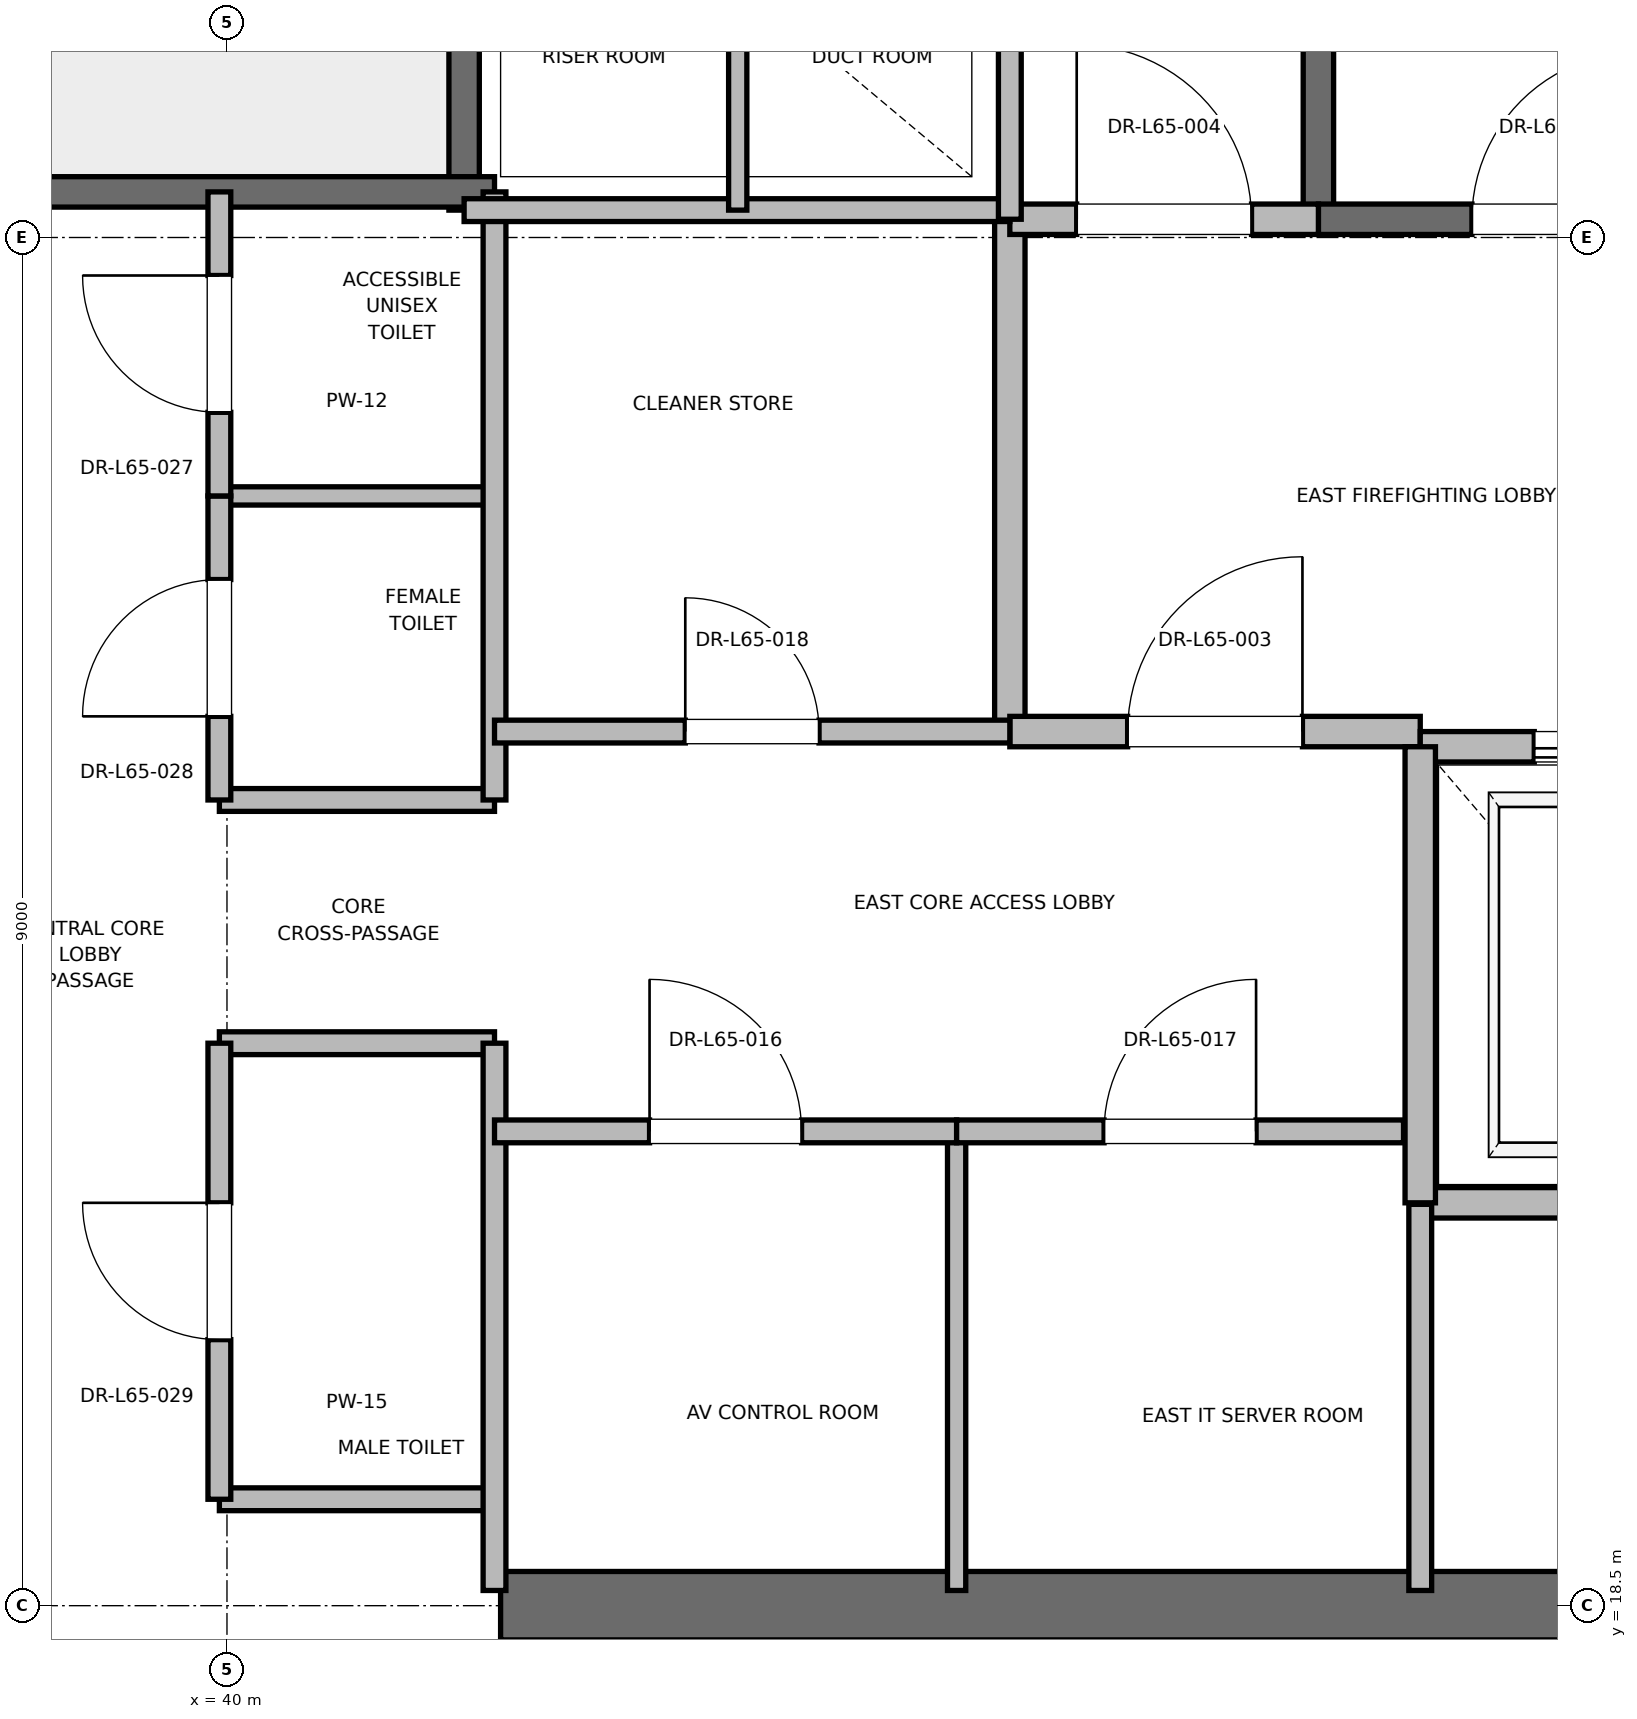
"""IFC4 building model, lengths in metres.
Left out: names, types, materials, properties, quantities, classifications, styles, units other than length and angle.
Written with IfcOpenShell. Run it as: python <this file> out.ifc"""

import sys

from ifc_helpers import new_model, si_unit, direction, frame, frame_2d, origin, place, context, subcontext, project, spatial, rectangle, extrude, element, fill, save


model = new_model("IFC4")
c1 = context("Model", 3, precision=1e-05, world=origin(), true_north=direction((0.0, 1.0)))
c2 = subcontext(c1, "Body", "Model", "MODEL_VIEW")
j1 = project(units=[si_unit("LENGTHUNIT", "METRE"), si_unit("PLANEANGLEUNIT", "RADIAN")], contexts=[c1])
p1 = place(None, origin())
s1 = spatial("IfcSite", under=j1, at=p1, CompositionType="ELEMENT")
p2 = place(p1, origin())
s2 = spatial("IfcBuilding", under=s1, at=p2, CompositionType="ELEMENT")
p3 = place(p2, frame((0.0, 0.0, 279.2)))
s3 = spatial("IfcBuildingStorey", under=s2, at=p3, CompositionType="ELEMENT", Elevation=279.2)
p4 = place(p3, frame((41.8, 18.5, 0.0), z_axis=(0.0, 0.0, 1.0), x_axis=(1.0, 0.0, 0.0)))
e1 = element("IfcWall", 1, at=p4, inside=s3, PredefinedType="SHEAR", context=c2, shape_type="SweptSolid", body=[
    extrude(rectangle(XDim=9.2, YDim=0.45, at=frame_2d((4.6, 0.0))), origin(), (0.0, 0.0, 1.0), 3.785),
])
p5 = place(p3, frame((47.18, 27.62, 0.0), z_axis=(0.0, 0.0, 1.0), x_axis=(0.0, 1.0, 0.0)))
e2 = element("IfcWall", 2, at=p5, inside=s3, PredefinedType="SOLIDWALL", context=c2, shape_type="SweptSolid", body=[
    extrude(rectangle(XDim=8.18, YDim=0.2, at=frame_2d((4.09, 0.0))), origin(), (0.0, 0.0, 1.0), 3.785),
])
p6 = place(p3, frame((47.18, 27.62, 0.0), z_axis=(0.0, 0.0, 1.0), x_axis=(1.0, 0.0, 0.0)))
e3 = element("IfcWall", 3, at=p6, inside=s3, PredefinedType="SOLIDWALL", context=c2, shape_type="SweptSolid", body=[
    extrude(rectangle(XDim=3.12, YDim=0.2, at=frame_2d((1.56, 0.0))), origin(), (0.0, 0.0, 1.0), 3.785),
])
p7 = place(p6, frame((1.01, 0.0, 0.0)))
e4 = element("IfcOpeningElement", 4, at=p7, cuts=e3, PredefinedType="OPENING", context=c2, shape_type="SweptSolid", body=[
    extrude(rectangle(XDim=1.1, YDim=2.15, at=frame_2d((0.55, 1.075))), frame((0.0, 0.1, 0.0), z_axis=(0.0, -1.0, 0.0), x_axis=(1.0, 0.0, 0.0)), (0.0, 0.0, 1.0), 0.2),
])
p8 = place(p3, frame((41.56, 27.68, 0.0), z_axis=(0.0, 0.0, 1.0), x_axis=(0.0, 1.0, 0.0)))
e5 = element("IfcWall", 5, at=p8, inside=s3, PredefinedType="SOLIDWALL", context=c2, shape_type="SweptSolid", body=[
    extrude(rectangle(XDim=8.57, YDim=0.2, at=frame_2d((4.285, 0.0))), origin(), (0.0, 0.0, 1.0), 3.785),
])
p9 = place(p3, frame((38.44, 27.8, 0.0), z_axis=(0.0, 0.0, 1.0), x_axis=(1.0, 0.0, 0.0)))
e6 = element("IfcWall", 6, at=p9, inside=s3, PredefinedType="SOLIDWALL", context=c2, shape_type="SweptSolid", body=[
    extrude(rectangle(XDim=3.32, YDim=0.2, at=frame_2d((1.66, 0.0))), origin(), (0.0, 0.0, 1.0), 3.785),
])
p10 = place(p3, frame((45.15, 24.25, 0.0), z_axis=(0.0, 0.0, 1.0), x_axis=(0.0, 1.0, 0.0)))
e7 = element("IfcWall", 7, at=p10, inside=s3, PredefinedType="PARTITIONING", context=c2, shape_type="SweptSolid", body=[
    extrude(rectangle(XDim=3.37, YDim=0.2, at=frame_2d((1.685, 0.0))), origin(), (0.0, 0.0, 1.0), 3.785),
])
p11 = place(p3, frame((45.15, 24.25, 0.0), z_axis=(0.0, 0.0, 1.0), x_axis=(1.0, 0.0, 0.0)))
e8 = element("IfcWall", 8, at=p11, inside=s3, PredefinedType="PARTITIONING", context=c2, shape_type="SweptSolid", body=[
    extrude(rectangle(XDim=2.7, YDim=0.2, at=frame_2d((1.35, 0.0))), origin(), (0.0, 0.0, 1.0), 3.785),
])
p12 = place(p11, frame((0.775, 0.0, 0.0)))
e9 = element("IfcOpeningElement", 9, at=p12, cuts=e8, PredefinedType="OPENING", context=c2, shape_type="SweptSolid", body=[
    extrude(rectangle(XDim=1.15, YDim=2.2, at=frame_2d((0.575, 1.1))), frame((0.0, 0.1, 0.0), z_axis=(0.0, -1.0, 0.0), x_axis=(1.0, 0.0, 0.0)), (0.0, 0.0, 1.0), 0.2),
])
p13 = place(p3, frame((45.15, 27.62, 0.0), z_axis=(0.0, 0.0, 1.0), x_axis=(1.0, 0.0, 0.0)))
e10 = element("IfcWall", 10, at=p13, inside=s3, PredefinedType="PARTITIONING", context=c2, shape_type="SweptSolid", body=[
    extrude(rectangle(XDim=2.03, YDim=0.2, at=frame_2d((1.015, 0.0))), origin(), (0.0, 0.0, 1.0), 3.785),
])
p14 = place(p13, frame((0.44, 0.0, 0.0)))
e11 = element("IfcOpeningElement", 11, at=p14, cuts=e10, PredefinedType="OPENING", context=c2, shape_type="SweptSolid", body=[
    extrude(rectangle(XDim=1.15, YDim=2.2, at=frame_2d((0.575, 1.1))), frame((0.0, 0.1, 0.0), z_axis=(0.0, -1.0, 0.0), x_axis=(1.0, 0.0, 0.0)), (0.0, 0.0, 1.0), 0.2),
])
p15 = place(p3, frame((47.85, 21.15, 0.0), z_axis=(0.0, 0.0, 1.0), x_axis=(1.0, 0.0, 0.0)))
e12 = element("IfcWall", 12, at=p15, inside=s3, PredefinedType="SOLIDWALL", context=c2, shape_type="SweptSolid", body=[
    extrude(rectangle(XDim=2.6, YDim=0.2, at=frame_2d((1.3, 0.0))), origin(), (0.0, 0.0, 1.0), 3.785),
])
p16 = place(p3, frame((50.45, 24.15, 0.0), z_axis=(0.0, 0.0, 1.0), x_axis=(-1.0, 0.0, 0.0)))
e13 = element("IfcWall", 13, at=p16, inside=s3, PredefinedType="SOLIDWALL", context=c2, shape_type="SweptSolid", body=[
    extrude(rectangle(XDim=2.6, YDim=0.2, at=frame_2d((1.3, 0.0))), origin(), (0.0, 0.0, 1.0), 2.865),
])
p17 = place(p16, frame((0.75, 0.0, 0.0)))
e14 = element("IfcOpeningElement", 14, at=p17, cuts=e13, PredefinedType="OPENING", context=c2, shape_type="SweptSolid", body=[
    extrude(rectangle(XDim=1.1, YDim=2.2, at=frame_2d((0.55, 1.1))), frame((0.0, 0.1, 0.0), z_axis=(0.0, -1.0, 0.0), x_axis=(1.0, 0.0, 0.0)), (0.0, 0.0, 1.0), 0.2),
])
p18 = place(p3, frame((47.85, 24.15, 0.0), z_axis=(0.0, 0.0, 1.0), x_axis=(0.0, -1.0, 0.0)))
e15 = element("IfcWall", 15, at=p18, inside=s3, PredefinedType="SOLIDWALL", context=c2, shape_type="SweptSolid", body=[
    extrude(rectangle(XDim=3.0, YDim=0.2, at=frame_2d((1.5, 0.0))), origin(), (0.0, 0.0, 1.0), 3.785),
])
for number, where, z_axis, x_axis in (
    (16, (39.95, 19.2, 0.0), (0.0, 0.0, 1.0), (1.0, 0.0, 0.0)),
    (17, (39.95, 22.2, 0.0), (0.0, 0.0, 1.0), (1.0, 0.0, 0.0)),
    (18, (39.95, 23.8, 0.0), (0.0, 0.0, 1.0), (1.0, 0.0, 0.0)),
):
    element("IfcWall", number, at=place(p3, frame(where, z_axis=z_axis, x_axis=x_axis)), inside=s3, PredefinedType="PARTITIONING", context=c2, shape_type="SweptSolid", body=[
        extrude(rectangle(XDim=1.81, YDim=0.15, at=frame_2d((0.905, 0.0))), origin(), (0.0, 0.0, 1.0), 2.85),
    ])
p19 = place(p3, frame((39.95, 25.8, 0.0), z_axis=(0.0, 0.0, 1.0), x_axis=(1.0, 0.0, 0.0)))
e19 = element("IfcWall", 19, at=p19, inside=s3, PredefinedType="PARTITIONING", context=c2, shape_type="SweptSolid", body=[
    extrude(rectangle(XDim=1.81, YDim=0.12, at=frame_2d((0.905, 0.0))), origin(), (0.0, 0.0, 1.0), 2.85),
])
p20 = place(p3, frame((41.76, 18.6, 0.0), z_axis=(0.0, 0.0, 1.0), x_axis=(0.0, 1.0, 0.0)))
e20 = element("IfcWall", 20, at=p20, inside=s3, PredefinedType="PARTITIONING", context=c2, shape_type="SweptSolid", body=[
    extrude(rectangle(XDim=3.6, YDim=0.15, at=frame_2d((1.8, 0.0))), origin(), (0.0, 0.0, 1.0), 2.85),
])
p21 = place(p3, frame((41.76, 23.8, 0.0), z_axis=(0.0, 0.0, 1.0), x_axis=(0.0, 1.0, 0.0)))
e21 = element("IfcWall", 21, at=p21, inside=s3, PredefinedType="PARTITIONING", context=c2, shape_type="SweptSolid", body=[
    extrude(rectangle(XDim=4.0, YDim=0.15, at=frame_2d((2.0, 0.0))), origin(), (0.0, 0.0, 1.0), 2.85),
])
p22 = place(p3, frame((39.95, 19.2, 0.0), z_axis=(0.0, 0.0, 1.0), x_axis=(0.0, 1.0, 0.0)))
e22 = element("IfcWall", 22, at=p22, inside=s3, PredefinedType="PARTITIONING", context=c2, shape_type="SweptSolid", body=[
    extrude(rectangle(XDim=3.0, YDim=0.15, at=frame_2d((1.5, 0.0))), origin(), (0.0, 0.0, 1.0), 2.85),
])
p23 = place(p22, frame((1.05, 0.0, 0.0)))
e23 = element("IfcOpeningElement", 23, at=p23, cuts=e22, PredefinedType="OPENING", context=c2, shape_type="SweptSolid", body=[
    extrude(rectangle(XDim=0.9, YDim=2.1, at=frame_2d((0.45, 1.05))), frame((0.0, 0.075, 0.0), z_axis=(0.0, -1.0, 0.0), x_axis=(1.0, 0.0, 0.0)), (0.0, 0.0, 1.0), 0.15),
])
p24 = place(p3, frame((39.95, 23.8, 0.0), z_axis=(0.0, 0.0, 1.0), x_axis=(0.0, 1.0, 0.0)))
e24 = element("IfcWall", 24, at=p24, inside=s3, PredefinedType="PARTITIONING", context=c2, shape_type="SweptSolid", body=[
    extrude(rectangle(XDim=2.0, YDim=0.15, at=frame_2d((1.0, 0.0))), origin(), (0.0, 0.0, 1.0), 2.85),
])
p25 = place(p24, frame((0.55, 0.0, 0.0)))
e25 = element("IfcOpeningElement", 25, at=p25, cuts=e24, PredefinedType="OPENING", context=c2, shape_type="SweptSolid", body=[
    extrude(rectangle(XDim=0.9, YDim=2.1, at=frame_2d((0.45, 1.05))), frame((0.0, 0.075, 0.0), z_axis=(0.0, -1.0, 0.0), x_axis=(1.0, 0.0, 0.0)), (0.0, 0.0, 1.0), 0.15),
])
p26 = place(p3, frame((39.95, 25.8, 0.0), z_axis=(0.0, 0.0, 1.0), x_axis=(0.0, 1.0, 0.0)))
e26 = element("IfcWall", 26, at=p26, inside=s3, PredefinedType="PARTITIONING", context=c2, shape_type="SweptSolid", body=[
    extrude(rectangle(XDim=2.0, YDim=0.15, at=frame_2d((1.0, 0.0))), origin(), (0.0, 0.0, 1.0), 2.85),
])
p27 = place(p26, frame((0.55, 0.0, 0.0)))
e27 = element("IfcOpeningElement", 27, at=p27, cuts=e26, PredefinedType="OPENING", context=c2, shape_type="SweptSolid", body=[
    extrude(rectangle(XDim=0.9, YDim=2.1, at=frame_2d((0.45, 1.05))), frame((0.0, 0.075, 0.0), z_axis=(0.0, -1.0, 0.0), x_axis=(1.0, 0.0, 0.0)), (0.0, 0.0, 1.0), 0.15),
])
p28 = place(p3, frame((41.56, 27.68, 0.0), z_axis=(0.0, 0.0, 1.0), x_axis=(1.0, 0.0, 0.0)))
e28 = element("IfcWall", 28, at=p28, inside=s3, PredefinedType="PARTITIONING", context=c2, shape_type="SweptSolid", body=[
    extrude(rectangle(XDim=3.59, YDim=0.15, at=frame_2d((1.795, 0.0))), origin(), (0.0, 0.0, 1.0), 2.85),
])
p29 = place(p3, frame((47.85, 18.6, 0.0), z_axis=(0.0, 0.0, 1.0), x_axis=(0.0, 1.0, 0.0)))
e29 = element("IfcWall", 29, at=p29, inside=s3, PredefinedType="PARTITIONING", context=c2, shape_type="SweptSolid", body=[
    extrude(rectangle(XDim=2.54, YDim=0.15, at=frame_2d((1.27, 0.0))), origin(), (0.0, 0.0, 1.0), 2.85),
])
p30 = place(p3, frame((44.8, 18.6, 0.0), z_axis=(0.0, 0.0, 1.0), x_axis=(0.0, 1.0, 0.0)))
e30 = element("IfcWall", 30, at=p30, inside=s3, PredefinedType="PARTITIONING", context=c2, shape_type="SweptSolid", body=[
    extrude(rectangle(XDim=3.02, YDim=0.12, at=frame_2d((1.51, 0.0))), origin(), (0.0, 0.0, 1.0), 2.85),
])
p31 = place(p3, frame((41.76, 21.62, 0.0), z_axis=(0.0, 0.0, 1.0), x_axis=(1.0, 0.0, 0.0)))
e31 = element("IfcWall", 31, at=p31, inside=s3, PredefinedType="PARTITIONING", context=c2, shape_type="SweptSolid", body=[
    extrude(rectangle(XDim=3.04, YDim=0.15, at=frame_2d((1.52, 0.0))), origin(), (0.0, 0.0, 1.0), 2.85),
])
p32 = place(p31, frame((1.02, 0.0, 0.0)))
e32 = element("IfcOpeningElement", 32, at=p32, cuts=e31, PredefinedType="OPENING", context=c2, shape_type="SweptSolid", body=[
    extrude(rectangle(XDim=1.0, YDim=2.15, at=frame_2d((0.5, 1.075))), frame((0.0, 0.075, 0.0), z_axis=(0.0, -1.0, 0.0), x_axis=(1.0, 0.0, 0.0)), (0.0, 0.0, 1.0), 0.15),
])
p33 = place(p3, frame((44.8, 21.62, 0.0), z_axis=(0.0, 0.0, 1.0), x_axis=(1.0, 0.0, 0.0)))
e33 = element("IfcWall", 33, at=p33, inside=s3, PredefinedType="PARTITIONING", context=c2, shape_type="SweptSolid", body=[
    extrude(rectangle(XDim=2.94, YDim=0.15, at=frame_2d((1.47, 0.0))), origin(), (0.0, 0.0, 1.0), 2.85),
])
p34 = place(p33, frame((0.97, 0.0, 0.0)))
e34 = element("IfcOpeningElement", 34, at=p34, cuts=e33, PredefinedType="OPENING", context=c2, shape_type="SweptSolid", body=[
    extrude(rectangle(XDim=1.0, YDim=2.15, at=frame_2d((0.5, 1.075))), frame((0.0, 0.075, 0.0), z_axis=(0.0, -1.0, 0.0), x_axis=(1.0, 0.0, 0.0)), (0.0, 0.0, 1.0), 0.15),
])
p35 = place(p3, frame((41.76, 24.25, 0.0), z_axis=(0.0, 0.0, 1.0), x_axis=(1.0, 0.0, 0.0)))
e35 = element("IfcWall", 35, at=p35, inside=s3, PredefinedType="PARTITIONING", context=c2, shape_type="SweptSolid", body=[
    extrude(rectangle(XDim=3.39, YDim=0.15, at=frame_2d((1.695, 0.0))), origin(), (0.0, 0.0, 1.0), 2.85),
])
p36 = place(p35, frame((1.255, 0.0, 0.0)))
e36 = element("IfcOpeningElement", 36, at=p36, cuts=e35, PredefinedType="OPENING", context=c2, shape_type="SweptSolid", body=[
    extrude(rectangle(XDim=0.88, YDim=2.1, at=frame_2d((0.44, 1.05))), frame((0.0, 0.075, 0.0), z_axis=(0.0, -1.0, 0.0), x_axis=(1.0, 0.0, 0.0)), (0.0, 0.0, 1.0), 0.15),
])
p37 = place(p3, frame((45.15, 27.62, 0.0), z_axis=(0.0, 0.0, 1.0), x_axis=(0.0, 1.0, 0.0)))
e37 = element("IfcWall", 37, at=p37, inside=s3, PredefinedType="PARTITIONING", context=c2, shape_type="SweptSolid", body=[
    extrude(rectangle(XDim=3.1, YDim=0.15, at=frame_2d((1.55, 0.0))), origin(), (0.0, 0.0, 1.0), 2.85),
])
p38 = place(p3, frame((43.36, 27.68, 0.0), z_axis=(0.0, 0.0, 1.0), x_axis=(0.0, 1.0, 0.0)))
e38 = element("IfcWall", 38, at=p38, inside=s3, PredefinedType="PARTITIONING", context=c2, shape_type="SweptSolid", body=[
    extrude(rectangle(XDim=3.04, YDim=0.12, at=frame_2d((1.52, 0.0))), origin(), (0.0, 0.0, 1.0), 2.85),
])
p39 = place(p7, origin())
e39 = element("IfcDoor", 39, at=p39, inside=s3, OperationType="SINGLE_SWING_RIGHT", PredefinedType="DOOR", context=c2, shape_type="SweptSolid", body=[
    extrude(rectangle(XDim=1.1, YDim=2.15, at=frame_2d((0.55, 1.075))), frame((0.0, 0.025, 0.0), z_axis=(0.0, -1.0, 0.0), x_axis=(1.0, 0.0, 0.0)), (0.0, 0.0, 1.0), 0.05),
])
fill(e4, e39)
p40 = place(p12, origin())
e40 = element("IfcDoor", 40, at=p40, inside=s3, OperationType="SINGLE_SWING_RIGHT", PredefinedType="DOOR", context=c2, shape_type="SweptSolid", body=[
    extrude(rectangle(XDim=1.15, YDim=2.2, at=frame_2d((0.575, 1.1))), frame((0.0, 0.025, 0.0), z_axis=(0.0, -1.0, 0.0), x_axis=(1.0, 0.0, 0.0)), (0.0, 0.0, 1.0), 0.05),
])
fill(e9, e40)
p41 = place(p14, origin())
e41 = element("IfcDoor", 41, at=p41, inside=s3, OperationType="SINGLE_SWING_LEFT", PredefinedType="DOOR", context=c2, shape_type="SweptSolid", body=[
    extrude(rectangle(XDim=1.15, YDim=2.2, at=frame_2d((0.575, 1.1))), frame((0.0, 0.025, 0.0), z_axis=(0.0, -1.0, 0.0), x_axis=(1.0, 0.0, 0.0)), (0.0, 0.0, 1.0), 0.05),
])
fill(e11, e41)
p42 = place(p17, origin())
e42 = element("IfcDoor", 42, at=p42, inside=s3, OperationType="SLIDING_TO_RIGHT", PredefinedType="DOOR", context=c2, shape_type="SweptSolid", body=[
    extrude(rectangle(XDim=1.1, YDim=2.2, at=frame_2d((0.55, 1.1))), frame((0.0, 0.025, 0.0), z_axis=(0.0, -1.0, 0.0), x_axis=(1.0, 0.0, 0.0)), (0.0, 0.0, 1.0), 0.05),
])
fill(e14, e42)
p43 = place(p23, origin())
e43 = element("IfcDoor", 43, at=p43, inside=s3, OperationType="SINGLE_SWING_RIGHT", PredefinedType="DOOR", context=c2, shape_type="SweptSolid", body=[
    extrude(rectangle(XDim=0.9, YDim=2.1, at=frame_2d((0.45, 1.05))), frame((0.0, 0.025, 0.0), z_axis=(0.0, -1.0, 0.0), x_axis=(1.0, 0.0, 0.0)), (0.0, 0.0, 1.0), 0.05),
])
fill(e23, e43)
p44 = place(p25, origin())
e44 = element("IfcDoor", 44, at=p44, inside=s3, OperationType="SINGLE_SWING_LEFT", PredefinedType="DOOR", context=c2, shape_type="SweptSolid", body=[
    extrude(rectangle(XDim=0.9, YDim=2.1, at=frame_2d((0.45, 1.05))), frame((0.0, 0.025, 0.0), z_axis=(0.0, -1.0, 0.0), x_axis=(1.0, 0.0, 0.0)), (0.0, 0.0, 1.0), 0.05),
])
fill(e25, e44)
p45 = place(p27, origin())
e45 = element("IfcDoor", 45, at=p45, inside=s3, OperationType="SINGLE_SWING_RIGHT", PredefinedType="DOOR", context=c2, shape_type="SweptSolid", body=[
    extrude(rectangle(XDim=0.9, YDim=2.1, at=frame_2d((0.45, 1.05))), frame((0.0, 0.025, 0.0), z_axis=(0.0, -1.0, 0.0), x_axis=(1.0, 0.0, 0.0)), (0.0, 0.0, 1.0), 0.05),
])
fill(e27, e45)
p46 = place(p32, origin())
e46 = element("IfcDoor", 46, at=p46, inside=s3, OperationType="SINGLE_SWING_LEFT", PredefinedType="DOOR", context=c2, shape_type="SweptSolid", body=[
    extrude(rectangle(XDim=1.0, YDim=2.15, at=frame_2d((0.5, 1.075))), frame((0.0, 0.025, 0.0), z_axis=(0.0, -1.0, 0.0), x_axis=(1.0, 0.0, 0.0)), (0.0, 0.0, 1.0), 0.05),
])
fill(e32, e46)
p47 = place(p34, origin())
e47 = element("IfcDoor", 47, at=p47, inside=s3, OperationType="SINGLE_SWING_RIGHT", PredefinedType="DOOR", context=c2, shape_type="SweptSolid", body=[
    extrude(rectangle(XDim=1.0, YDim=2.15, at=frame_2d((0.5, 1.075))), frame((0.0, 0.025, 0.0), z_axis=(0.0, -1.0, 0.0), x_axis=(1.0, 0.0, 0.0)), (0.0, 0.0, 1.0), 0.05),
])
fill(e34, e47)
p48 = place(p36, origin())
e48 = element("IfcDoor", 48, at=p48, inside=s3, OperationType="SINGLE_SWING_LEFT", PredefinedType="DOOR", context=c2, shape_type="SweptSolid", body=[
    extrude(rectangle(XDim=0.88, YDim=2.1, at=frame_2d((0.44, 1.05))), frame((0.0, 0.025, 0.0), z_axis=(0.0, -1.0, 0.0), x_axis=(1.0, 0.0, 0.0)), (0.0, 0.0, 1.0), 0.05),
])
fill(e36, e48)
save(model, sys.argv[1])
